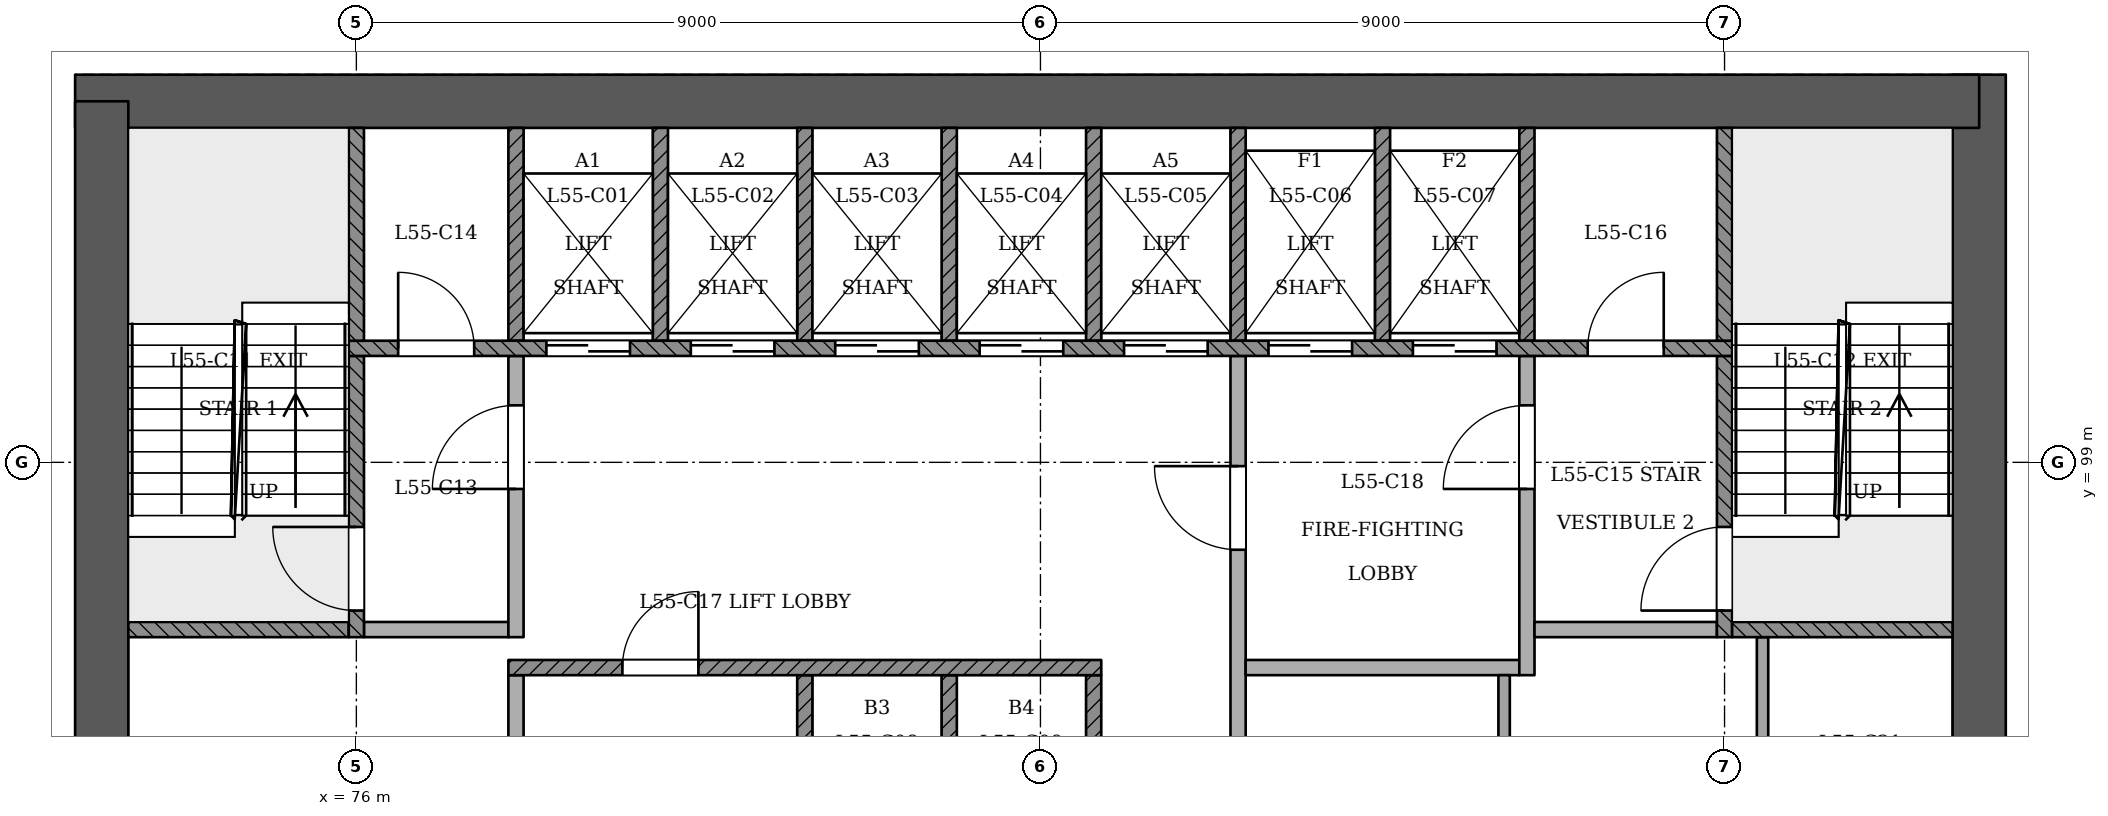
"""IFC4 building model, lengths in metres.
Left out: names, types, materials, properties, quantities, classifications, styles, units other than length and angle.
Written with IfcOpenShell. Run it as: python <this file> out.ifc"""

import sys

from ifc_helpers import new_model, si_unit, direction, frame, frame_2d, origin, place, context, subcontext, project, spatial, rectangle, extrude, element, fill, save


model = new_model("IFC4")
c1 = context("Model", 3, precision=1e-05, world=origin(), true_north=direction((0.0, 1.0)))
c2 = subcontext(c1, "Body", "Model", "MODEL_VIEW")
j1 = project(units=[si_unit("LENGTHUNIT", "METRE"), si_unit("PLANEANGLEUNIT", "RADIAN")], contexts=[c1])
p1 = place(None, origin())
s1 = spatial("IfcSite", under=j1, at=p1, CompositionType="ELEMENT")
p2 = place(p1, origin())
s2 = spatial("IfcBuilding", under=s1, at=p2, CompositionType="ELEMENT")
p3 = place(p2, frame((0.0, 0.0, 212.4)))
s3 = spatial("IfcBuildingStorey", under=s2, at=p3, CompositionType="ELEMENT", Elevation=212.4)
p4 = place(p3, frame((97.35, 93.05, 0.0), z_axis=(0.0, 0.0, 1.0), x_axis=(0.0, 1.0, 0.0)))
e1 = element("IfcWall", 1, at=p4, inside=s3, PredefinedType="SHEAR", context=c2, shape_type="SweptSolid", body=[
    extrude(rectangle(XDim=11.05, YDim=0.7, at=frame_2d((5.525, 0.0))), origin(), (0.0, 0.0, 1.0), 7.0),
])
p5 = place(p3, frame((97.35, 103.75, 0.0), z_axis=(0.0, 0.0, 1.0), x_axis=(-1.0, 0.0, 0.0)))
e2 = element("IfcWall", 2, at=p5, inside=s3, PredefinedType="SHEAR", context=c2, shape_type="SweptSolid", body=[
    extrude(rectangle(XDim=25.05, YDim=0.7, at=frame_2d((12.525, 0.0))), origin(), (0.0, 0.0, 1.0), 7.0),
])
p6 = place(p3, frame((72.65, 103.75, 0.0), z_axis=(0.0, 0.0, 1.0), x_axis=(0.0, -1.0, 0.0)))
e3 = element("IfcWall", 3, at=p6, inside=s3, PredefinedType="SHEAR", context=c2, shape_type="SweptSolid", body=[
    extrude(rectangle(XDim=11.05, YDim=0.7, at=frame_2d((5.525, 0.0))), origin(), (0.0, 0.0, 1.0), 7.0),
])
p7 = place(p3, frame((78.1, 93.4, 0.0), z_axis=(0.0, 0.0, 1.0), x_axis=(0.0, 1.0, 0.0)))
e4 = element("IfcWall", 4, at=p7, inside=s3, PredefinedType="PARTITIONING", context=c2, shape_type="SweptSolid", body=[
    extrude(rectangle(XDim=2.8, YDim=0.2, at=frame_2d((1.4, 0.0))), origin(), (0.0, 0.0, 1.0), 6.6),
])
for number, where, z_axis, x_axis in (
    (5, (81.9, 93.4, 0.0), (0.0, 0.0, 1.0), (0.0, 1.0, 0.0)),
    (6, (83.8, 93.4, 0.0), (0.0, 0.0, 1.0), (0.0, 1.0, 0.0)),
    (7, (85.7, 93.4, 0.0), (0.0, 0.0, 1.0), (0.0, 1.0, 0.0)),
):
    element("IfcWall", number, at=place(p3, frame(where, z_axis=z_axis, x_axis=x_axis)), inside=s3, PredefinedType="SOLIDWALL", context=c2, shape_type="SweptSolid", body=[
        extrude(rectangle(XDim=2.8, YDim=0.2, at=frame_2d((1.4, 0.0))), origin(), (0.0, 0.0, 1.0), 6.6),
    ])
p8 = place(p3, frame((87.6, 93.4, 0.0), z_axis=(0.0, 0.0, 1.0), x_axis=(0.0, 1.0, 0.0)))
e8 = element("IfcWall", 8, at=p8, inside=s3, PredefinedType="PARTITIONING", context=c2, shape_type="SweptSolid", body=[
    extrude(rectangle(XDim=7.0, YDim=0.2, at=frame_2d((3.5, 0.0))), origin(), (0.0, 0.0, 1.0), 6.6),
])
p9 = place(p8, frame((4.45, 0.0, 0.0)))
e9 = element("IfcOpeningElement", 9, at=p9, cuts=e8, PredefinedType="OPENING", context=c2, shape_type="SweptSolid", body=[
    extrude(rectangle(XDim=1.1, YDim=2.1, at=frame_2d((0.55, 1.05))), frame((0.0, 0.11, 0.0), z_axis=(0.0, -1.0, 0.0), x_axis=(1.0, 0.0, 0.0)), (0.0, 0.0, 1.0), 0.221),
])
p10 = place(p3, frame((91.1, 93.4, 0.0), z_axis=(0.0, 0.0, 1.0), x_axis=(0.0, 1.0, 0.0)))
e10 = element("IfcWall", 10, at=p10, inside=s3, PredefinedType="PARTITIONING", context=c2, shape_type="SweptSolid", body=[
    extrude(rectangle(XDim=2.8, YDim=0.15, at=frame_2d((1.4, 0.0))), origin(), (0.0, 0.0, 1.0), 6.6),
])
p11 = place(p3, frame((94.5, 93.4, 0.0), z_axis=(0.0, 0.0, 1.0), x_axis=(0.0, 1.0, 0.0)))
e11 = element("IfcWall", 11, at=p11, inside=s3, PredefinedType="PARTITIONING", context=c2, shape_type="SweptSolid", body=[
    extrude(rectangle(XDim=3.3, YDim=0.15, at=frame_2d((1.65, 0.0))), origin(), (0.0, 0.0, 1.0), 6.6),
])
p12 = place(p3, frame((78.0, 96.3, 0.0), z_axis=(0.0, 0.0, 1.0), x_axis=(1.0, 0.0, 0.0)))
e12 = element("IfcWall", 12, at=p12, inside=s3, PredefinedType="SOLIDWALL", context=c2, shape_type="SweptSolid", body=[
    extrude(rectangle(XDim=7.8, YDim=0.2, at=frame_2d((3.9, 0.0))), origin(), (0.0, 0.0, 1.0), 6.6),
])
p13 = place(p12, frame((1.5, 0.0, 0.0)))
e13 = element("IfcOpeningElement", 13, at=p13, cuts=e12, PredefinedType="OPENING", context=c2, shape_type="SweptSolid", body=[
    extrude(rectangle(XDim=1.0, YDim=2.1, at=frame_2d((0.5, 1.05))), frame((0.0, 0.11, 0.0), z_axis=(0.0, -1.0, 0.0), x_axis=(1.0, 0.0, 0.0)), (0.0, 0.0, 1.0), 0.221),
])
p14 = place(p3, frame((87.7, 96.3, 0.0), z_axis=(0.0, 0.0, 1.0), x_axis=(1.0, 0.0, 0.0)))
e14 = element("IfcWall", 14, at=p14, inside=s3, PredefinedType="PARTITIONING", context=c2, shape_type="SweptSolid", body=[
    extrude(rectangle(XDim=3.6, YDim=0.2, at=frame_2d((1.8, 0.0))), origin(), (0.0, 0.0, 1.0), 6.6),
])
p15 = place(p3, frame((91.4, 96.2, 0.0), z_axis=(0.0, 0.0, 1.0), x_axis=(0.0, 1.0, 0.0)))
e15 = element("IfcWall", 15, at=p15, inside=s3, PredefinedType="PARTITIONING", context=c2, shape_type="SweptSolid", body=[
    extrude(rectangle(XDim=4.2, YDim=0.2, at=frame_2d((2.1, 0.0))), origin(), (0.0, 0.0, 1.0), 6.6),
])
p16 = place(p15, frame((2.45, 0.0, 0.0)))
e16 = element("IfcOpeningElement", 16, at=p16, cuts=e15, PredefinedType="OPENING", context=c2, shape_type="SweptSolid", body=[
    extrude(rectangle(XDim=1.1, YDim=2.1, at=frame_2d((0.55, 1.05))), frame((0.0, 0.11, 0.0), z_axis=(0.0, -1.0, 0.0), x_axis=(1.0, 0.0, 0.0)), (0.0, 0.0, 1.0), 0.221),
])
p17 = place(p3, frame((73.0, 96.8, 0.0), z_axis=(0.0, 0.0, 1.0), x_axis=(1.0, 0.0, 0.0)))
e17 = element("IfcWall", 17, at=p17, inside=s3, PredefinedType="SOLIDWALL", context=c2, shape_type="SweptSolid", body=[
    extrude(rectangle(XDim=2.9, YDim=0.2, at=frame_2d((1.45, 0.0))), origin(), (0.0, 0.0, 1.0), 6.6),
])
p18 = place(p3, frame((76.0, 96.7, 0.0), z_axis=(0.0, 0.0, 1.0), x_axis=(0.0, 1.0, 0.0)))
e18 = element("IfcWall", 18, at=p18, inside=s3, PredefinedType="SOLIDWALL", context=c2, shape_type="SweptSolid", body=[
    extrude(rectangle(XDim=3.7, YDim=0.2, at=frame_2d((1.85, 0.0))), origin(), (0.0, 0.0, 1.0), 6.6),
])
p19 = place(p18, frame((0.35, 0.0, 0.0)))
e19 = element("IfcOpeningElement", 19, at=p19, cuts=e18, PredefinedType="OPENING", context=c2, shape_type="SweptSolid", body=[
    extrude(rectangle(XDim=1.1, YDim=2.1, at=frame_2d((0.55, 1.05))), frame((0.0, 0.11, 0.0), z_axis=(0.0, -1.0, 0.0), x_axis=(1.0, 0.0, 0.0)), (0.0, 0.0, 1.0), 0.221),
])
p20 = place(p3, frame((76.1, 96.8, 0.0), z_axis=(0.0, 0.0, 1.0), x_axis=(1.0, 0.0, 0.0)))
e20 = element("IfcWall", 20, at=p20, inside=s3, PredefinedType="PARTITIONING", context=c2, shape_type="SweptSolid", body=[
    extrude(rectangle(XDim=1.9, YDim=0.2, at=frame_2d((0.95, 0.0))), origin(), (0.0, 0.0, 1.0), 6.6),
])
p21 = place(p3, frame((78.1, 96.7, 0.0), z_axis=(0.0, 0.0, 1.0), x_axis=(0.0, 1.0, 0.0)))
e21 = element("IfcWall", 21, at=p21, inside=s3, PredefinedType="PARTITIONING", context=c2, shape_type="SweptSolid", body=[
    extrude(rectangle(XDim=3.7, YDim=0.2, at=frame_2d((1.85, 0.0))), origin(), (0.0, 0.0, 1.0), 6.6),
])
p22 = place(p21, frame((1.95, 0.0, 0.0)))
e22 = element("IfcOpeningElement", 22, at=p22, cuts=e21, PredefinedType="OPENING", context=c2, shape_type="SweptSolid", body=[
    extrude(rectangle(XDim=1.1, YDim=2.1, at=frame_2d((0.55, 1.05))), frame((0.0, 0.11, 0.0), z_axis=(0.0, -1.0, 0.0), x_axis=(1.0, 0.0, 0.0)), (0.0, 0.0, 1.0), 0.221),
])
p23 = place(p3, frame((91.5, 96.8, 0.0), z_axis=(0.0, 0.0, 1.0), x_axis=(1.0, 0.0, 0.0)))
e23 = element("IfcWall", 23, at=p23, inside=s3, PredefinedType="PARTITIONING", context=c2, shape_type="SweptSolid", body=[
    extrude(rectangle(XDim=2.4, YDim=0.2, at=frame_2d((1.2, 0.0))), origin(), (0.0, 0.0, 1.0), 6.6),
])
p24 = place(p3, frame((94.0, 96.7, 0.0), z_axis=(0.0, 0.0, 1.0), x_axis=(0.0, 1.0, 0.0)))
e24 = element("IfcWall", 24, at=p24, inside=s3, PredefinedType="SOLIDWALL", context=c2, shape_type="SweptSolid", body=[
    extrude(rectangle(XDim=3.7, YDim=0.2, at=frame_2d((1.85, 0.0))), origin(), (0.0, 0.0, 1.0), 6.6),
])
p25 = place(p24, frame((0.35, 0.0, 0.0)))
e25 = element("IfcOpeningElement", 25, at=p25, cuts=e24, PredefinedType="OPENING", context=c2, shape_type="SweptSolid", body=[
    extrude(rectangle(XDim=1.1, YDim=2.1, at=frame_2d((0.55, 1.05))), frame((0.0, 0.11, 0.0), z_axis=(0.0, -1.0, 0.0), x_axis=(1.0, 0.0, 0.0)), (0.0, 0.0, 1.0), 0.221),
])
p26 = place(p3, frame((94.1, 96.8, 0.0), z_axis=(0.0, 0.0, 1.0), x_axis=(1.0, 0.0, 0.0)))
e26 = element("IfcWall", 26, at=p26, inside=s3, PredefinedType="SOLIDWALL", context=c2, shape_type="SweptSolid", body=[
    extrude(rectangle(XDim=2.9, YDim=0.2, at=frame_2d((1.45, 0.0))), origin(), (0.0, 0.0, 1.0), 6.6),
])
p27 = place(p3, frame((75.9, 100.5, 0.0), z_axis=(0.0, 0.0, 1.0), x_axis=(1.0, 0.0, 0.0)))
e27 = element("IfcWall", 27, at=p27, inside=s3, PredefinedType="SOLIDWALL", context=c2, shape_type="SweptSolid", body=[
    extrude(rectangle(XDim=18.2, YDim=0.2, at=frame_2d((9.1, 0.0))), origin(), (0.0, 0.0, 1.0), 6.6),
])
p28 = place(p27, frame((2.6, 0.0, 0.0)))
e28 = element("IfcOpeningElement", 28, at=p28, cuts=e27, PredefinedType="OPENING", context=c2, shape_type="SweptSolid", body=[
    extrude(rectangle(XDim=1.1, YDim=2.1, at=frame_2d((0.55, 1.05))), frame((0.0, 0.11, 0.0), z_axis=(0.0, -1.0, 0.0), x_axis=(1.0, 0.0, 0.0)), (0.0, 0.0, 1.0), 0.221),
])
p29 = place(p27, frame((4.5, 0.0, 0.0)))
e29 = element("IfcOpeningElement", 29, at=p29, cuts=e27, PredefinedType="OPENING", context=c2, shape_type="SweptSolid", body=[
    extrude(rectangle(XDim=1.1, YDim=2.1, at=frame_2d((0.55, 1.05))), frame((0.0, 0.11, 0.0), z_axis=(0.0, -1.0, 0.0), x_axis=(1.0, 0.0, 0.0)), (0.0, 0.0, 1.0), 0.221),
])
p30 = place(p27, frame((6.4, 0.0, 0.0)))
e30 = element("IfcOpeningElement", 30, at=p30, cuts=e27, PredefinedType="OPENING", context=c2, shape_type="SweptSolid", body=[
    extrude(rectangle(XDim=1.1, YDim=2.1, at=frame_2d((0.55, 1.05))), frame((0.0, 0.11, 0.0), z_axis=(0.0, -1.0, 0.0), x_axis=(1.0, 0.0, 0.0)), (0.0, 0.0, 1.0), 0.221),
])
p31 = place(p27, frame((8.3, 0.0, 0.0)))
e31 = element("IfcOpeningElement", 31, at=p31, cuts=e27, PredefinedType="OPENING", context=c2, shape_type="SweptSolid", body=[
    extrude(rectangle(XDim=1.1, YDim=2.1, at=frame_2d((0.55, 1.05))), frame((0.0, 0.11, 0.0), z_axis=(0.0, -1.0, 0.0), x_axis=(1.0, 0.0, 0.0)), (0.0, 0.0, 1.0), 0.221),
])
p32 = place(p27, frame((10.2, 0.0, 0.0)))
e32 = element("IfcOpeningElement", 32, at=p32, cuts=e27, PredefinedType="OPENING", context=c2, shape_type="SweptSolid", body=[
    extrude(rectangle(XDim=1.1, YDim=2.1, at=frame_2d((0.55, 1.05))), frame((0.0, 0.11, 0.0), z_axis=(0.0, -1.0, 0.0), x_axis=(1.0, 0.0, 0.0)), (0.0, 0.0, 1.0), 0.221),
])
p33 = place(p27, frame((12.1, 0.0, 0.0)))
e33 = element("IfcOpeningElement", 33, at=p33, cuts=e27, PredefinedType="OPENING", context=c2, shape_type="SweptSolid", body=[
    extrude(rectangle(XDim=1.1, YDim=2.1, at=frame_2d((0.55, 1.05))), frame((0.0, 0.11, 0.0), z_axis=(0.0, -1.0, 0.0), x_axis=(1.0, 0.0, 0.0)), (0.0, 0.0, 1.0), 0.221),
])
p34 = place(p27, frame((14.0, 0.0, 0.0)))
e34 = element("IfcOpeningElement", 34, at=p34, cuts=e27, PredefinedType="OPENING", context=c2, shape_type="SweptSolid", body=[
    extrude(rectangle(XDim=1.1, YDim=2.1, at=frame_2d((0.55, 1.05))), frame((0.0, 0.11, 0.0), z_axis=(0.0, -1.0, 0.0), x_axis=(1.0, 0.0, 0.0)), (0.0, 0.0, 1.0), 0.221),
])
p35 = place(p27, frame((0.65, 0.0, 0.0)))
e35 = element("IfcOpeningElement", 35, at=p35, cuts=e27, PredefinedType="OPENING", context=c2, shape_type="SweptSolid", body=[
    extrude(rectangle(XDim=1.0, YDim=2.1, at=frame_2d((0.5, 1.05))), frame((0.0, 0.11, 0.0), z_axis=(0.0, -1.0, 0.0), x_axis=(1.0, 0.0, 0.0)), (0.0, 0.0, 1.0), 0.221),
])
p36 = place(p27, frame((16.3, 0.0, 0.0)))
e36 = element("IfcOpeningElement", 36, at=p36, cuts=e27, PredefinedType="OPENING", context=c2, shape_type="SweptSolid", body=[
    extrude(rectangle(XDim=1.0, YDim=2.1, at=frame_2d((0.5, 1.05))), frame((0.0, 0.11, 0.0), z_axis=(0.0, -1.0, 0.0), x_axis=(1.0, 0.0, 0.0)), (0.0, 0.0, 1.0), 0.221),
])
for number, where, z_axis, x_axis in (
    (37, (76.0, 100.6, 0.0), (0.0, 0.0, 1.0), (0.0, 1.0, 0.0)),
    (38, (78.1, 100.6, 0.0), (0.0, 0.0, 1.0), (0.0, 1.0, 0.0)),
    (39, (80.0, 100.6, 0.0), (0.0, 0.0, 1.0), (0.0, 1.0, 0.0)),
    (40, (81.9, 100.6, 0.0), (0.0, 0.0, 1.0), (0.0, 1.0, 0.0)),
    (41, (83.8, 100.6, 0.0), (0.0, 0.0, 1.0), (0.0, 1.0, 0.0)),
    (42, (85.7, 100.6, 0.0), (0.0, 0.0, 1.0), (0.0, 1.0, 0.0)),
    (43, (87.6, 100.6, 0.0), (0.0, 0.0, 1.0), (0.0, 1.0, 0.0)),
    (44, (89.5, 100.6, 0.0), (0.0, 0.0, 1.0), (0.0, 1.0, 0.0)),
    (45, (91.4, 100.6, 0.0), (0.0, 0.0, 1.0), (0.0, 1.0, 0.0)),
    (46, (94.0, 100.6, 0.0), (0.0, 0.0, 1.0), (0.0, 1.0, 0.0)),
):
    element("IfcWall", number, at=place(p3, frame(where, z_axis=z_axis, x_axis=x_axis)), inside=s3, PredefinedType="SOLIDWALL", context=c2, shape_type="SweptSolid", body=[
        extrude(rectangle(XDim=2.8, YDim=0.2, at=frame_2d((1.4, 0.0))), origin(), (0.0, 0.0, 1.0), 6.6),
    ])
p37 = place(p28, origin())
e47 = element("IfcDoor", 47, at=p37, inside=s3, OperationType="SLIDING_TO_RIGHT", PredefinedType="NOTDEFINED", context=c2, shape_type="SweptSolid", body=[
    extrude(rectangle(XDim=1.1, YDim=2.1, at=frame_2d((0.55, 1.05))), frame((0.0, 0.025, 0.0), z_axis=(0.0, -1.0, 0.0), x_axis=(1.0, 0.0, 0.0)), (0.0, 0.0, 1.0), 0.05),
])
fill(e28, e47)
p38 = place(p29, origin())
e48 = element("IfcDoor", 48, at=p38, inside=s3, OperationType="SLIDING_TO_LEFT", PredefinedType="NOTDEFINED", context=c2, shape_type="SweptSolid", body=[
    extrude(rectangle(XDim=1.1, YDim=2.1, at=frame_2d((0.55, 1.05))), frame((0.0, 0.025, 0.0), z_axis=(0.0, -1.0, 0.0), x_axis=(1.0, 0.0, 0.0)), (0.0, 0.0, 1.0), 0.05),
])
fill(e29, e48)
p39 = place(p30, origin())
e49 = element("IfcDoor", 49, at=p39, inside=s3, OperationType="SLIDING_TO_RIGHT", PredefinedType="NOTDEFINED", context=c2, shape_type="SweptSolid", body=[
    extrude(rectangle(XDim=1.1, YDim=2.1, at=frame_2d((0.55, 1.05))), frame((0.0, 0.025, 0.0), z_axis=(0.0, -1.0, 0.0), x_axis=(1.0, 0.0, 0.0)), (0.0, 0.0, 1.0), 0.05),
])
fill(e30, e49)
p40 = place(p31, origin())
e50 = element("IfcDoor", 50, at=p40, inside=s3, OperationType="SLIDING_TO_LEFT", PredefinedType="NOTDEFINED", context=c2, shape_type="SweptSolid", body=[
    extrude(rectangle(XDim=1.1, YDim=2.1, at=frame_2d((0.55, 1.05))), frame((0.0, 0.025, 0.0), z_axis=(0.0, -1.0, 0.0), x_axis=(1.0, 0.0, 0.0)), (0.0, 0.0, 1.0), 0.05),
])
fill(e31, e50)
p41 = place(p32, origin())
e51 = element("IfcDoor", 51, at=p41, inside=s3, OperationType="SLIDING_TO_RIGHT", PredefinedType="NOTDEFINED", context=c2, shape_type="SweptSolid", body=[
    extrude(rectangle(XDim=1.1, YDim=2.1, at=frame_2d((0.55, 1.05))), frame((0.0, 0.025, 0.0), z_axis=(0.0, -1.0, 0.0), x_axis=(1.0, 0.0, 0.0)), (0.0, 0.0, 1.0), 0.05),
])
fill(e32, e51)
p42 = place(p33, origin())
e52 = element("IfcDoor", 52, at=p42, inside=s3, OperationType="SLIDING_TO_RIGHT", PredefinedType="NOTDEFINED", context=c2, shape_type="SweptSolid", body=[
    extrude(rectangle(XDim=1.1, YDim=2.1, at=frame_2d((0.55, 1.05))), frame((0.0, 0.025, 0.0), z_axis=(0.0, -1.0, 0.0), x_axis=(1.0, 0.0, 0.0)), (0.0, 0.0, 1.0), 0.05),
])
fill(e33, e52)
p43 = place(p34, origin())
e53 = element("IfcDoor", 53, at=p43, inside=s3, OperationType="SLIDING_TO_LEFT", PredefinedType="NOTDEFINED", context=c2, shape_type="SweptSolid", body=[
    extrude(rectangle(XDim=1.1, YDim=2.1, at=frame_2d((0.55, 1.05))), frame((0.0, 0.025, 0.0), z_axis=(0.0, -1.0, 0.0), x_axis=(1.0, 0.0, 0.0)), (0.0, 0.0, 1.0), 0.05),
])
fill(e34, e53)
p44 = place(p19, origin())
e54 = element("IfcDoor", 54, at=p44, inside=s3, OperationType="SINGLE_SWING_RIGHT", PredefinedType="NOTDEFINED", context=c2, shape_type="SweptSolid", body=[
    extrude(rectangle(XDim=1.1, YDim=2.1, at=frame_2d((0.55, 1.05))), frame((0.0, 0.025, 0.0), z_axis=(0.0, -1.0, 0.0), x_axis=(1.0, 0.0, 0.0)), (0.0, 0.0, 1.0), 0.05),
])
fill(e19, e54)
p45 = place(p25, origin())
e55 = element("IfcDoor", 55, at=p45, inside=s3, OperationType="SINGLE_SWING_LEFT", PredefinedType="NOTDEFINED", context=c2, shape_type="SweptSolid", body=[
    extrude(rectangle(XDim=1.1, YDim=2.1, at=frame_2d((0.55, 1.05))), frame((0.0, 0.025, 0.0), z_axis=(0.0, -1.0, 0.0), x_axis=(1.0, 0.0, 0.0)), (0.0, 0.0, 1.0), 0.05),
])
fill(e25, e55)
p46 = place(p22, origin())
e56 = element("IfcDoor", 56, at=p46, inside=s3, OperationType="SINGLE_SWING_LEFT", PredefinedType="NOTDEFINED", context=c2, shape_type="SweptSolid", body=[
    extrude(rectangle(XDim=1.1, YDim=2.1, at=frame_2d((0.55, 1.05))), frame((0.0, 0.025, 0.0), z_axis=(0.0, -1.0, 0.0), x_axis=(1.0, 0.0, 0.0)), (0.0, 0.0, 1.0), 0.05),
])
fill(e22, e56)
p47 = place(p9, origin())
e57 = element("IfcDoor", 57, at=p47, inside=s3, OperationType="SINGLE_SWING_RIGHT", PredefinedType="NOTDEFINED", context=c2, shape_type="SweptSolid", body=[
    extrude(rectangle(XDim=1.1, YDim=2.1, at=frame_2d((0.55, 1.05))), frame((0.0, 0.025, 0.0), z_axis=(0.0, -1.0, 0.0), x_axis=(1.0, 0.0, 0.0)), (0.0, 0.0, 1.0), 0.05),
])
fill(e9, e57)
p48 = place(p16, origin())
e58 = element("IfcDoor", 58, at=p48, inside=s3, OperationType="SINGLE_SWING_LEFT", PredefinedType="NOTDEFINED", context=c2, shape_type="SweptSolid", body=[
    extrude(rectangle(XDim=1.1, YDim=2.1, at=frame_2d((0.55, 1.05))), frame((0.0, 0.025, 0.0), z_axis=(0.0, -1.0, 0.0), x_axis=(1.0, 0.0, 0.0)), (0.0, 0.0, 1.0), 0.05),
])
fill(e16, e58)
p49 = place(p35, origin())
e59 = element("IfcDoor", 59, at=p49, inside=s3, OperationType="SINGLE_SWING_LEFT", PredefinedType="NOTDEFINED", context=c2, shape_type="SweptSolid", body=[
    extrude(rectangle(XDim=1.0, YDim=2.1, at=frame_2d((0.5, 1.05))), frame((0.0, 0.025, 0.0), z_axis=(0.0, -1.0, 0.0), x_axis=(1.0, 0.0, 0.0)), (0.0, 0.0, 1.0), 0.05),
])
fill(e35, e59)
p50 = place(p36, origin())
e60 = element("IfcDoor", 60, at=p50, inside=s3, OperationType="SINGLE_SWING_RIGHT", PredefinedType="NOTDEFINED", context=c2, shape_type="SweptSolid", body=[
    extrude(rectangle(XDim=1.0, YDim=2.1, at=frame_2d((0.5, 1.05))), frame((0.0, 0.025, 0.0), z_axis=(0.0, -1.0, 0.0), x_axis=(1.0, 0.0, 0.0)), (0.0, 0.0, 1.0), 0.05),
])
fill(e36, e60)
p51 = place(p13, origin())
e61 = element("IfcDoor", 61, at=p51, inside=s3, OperationType="SINGLE_SWING_RIGHT", PredefinedType="NOTDEFINED", context=c2, shape_type="SweptSolid", body=[
    extrude(rectangle(XDim=1.0, YDim=2.1, at=frame_2d((0.5, 1.05))), frame((0.0, 0.025, 0.0), z_axis=(0.0, -1.0, 0.0), x_axis=(1.0, 0.0, 0.0)), (0.0, 0.0, 1.0), 0.05),
])
fill(e13, e61)
save(model, sys.argv[1])
